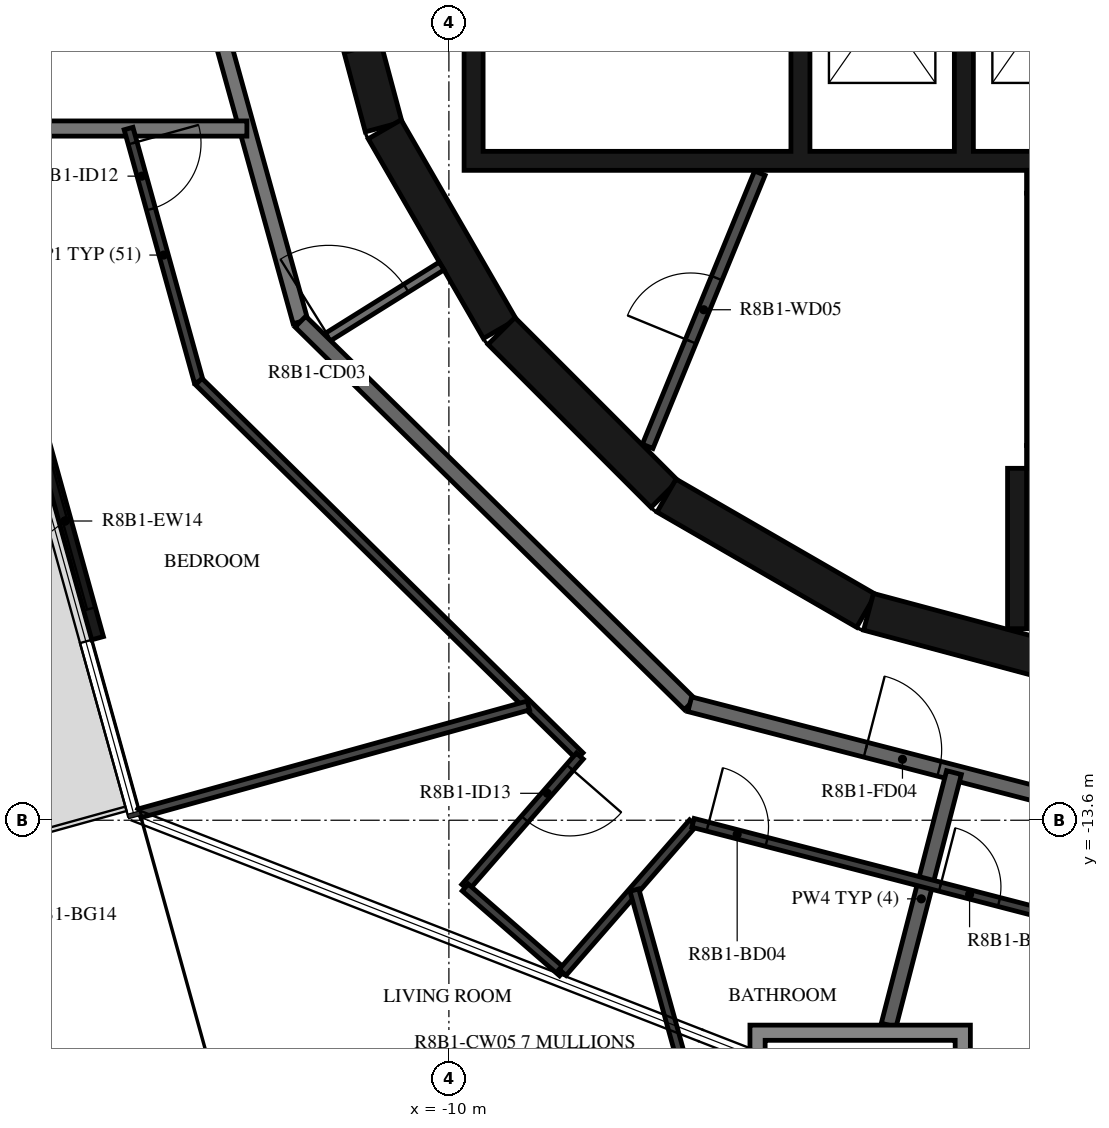
"""IFC4 building model, lengths in metres.
Left out: names, types, materials, properties, quantities, classifications, styles, units other than length and angle.
Written with IfcOpenShell. Run it as: python <this file> out.ifc"""

import sys

from ifc_helpers import new_model, si_unit, direction, frame, frame_2d, origin, place, context, subcontext, project, spatial, polyline, rectangle, outline, extrude, element, fill, save


model = new_model("IFC4")
c1 = context("Model", 3, precision=1e-05, world=origin(), true_north=direction((0.0, 1.0)))
c2 = subcontext(c1, "Body", "Model", "MODEL_VIEW")
j1 = project(units=[si_unit("LENGTHUNIT", "METRE"), si_unit("PLANEANGLEUNIT", "RADIAN")], contexts=[c1])
p1 = place(None, origin())
s1 = spatial("IfcSite", under=j1, at=p1, CompositionType="ELEMENT")
p2 = place(p1, origin())
s2 = spatial("IfcBuilding", under=s1, at=p2, CompositionType="ELEMENT")
p3 = place(p2, frame((0.0, 0.0, 308.7)))
s3 = spatial("IfcBuildingStorey", under=s2, at=p3, CompositionType="ELEMENT", Elevation=308.7)
p4 = place(p3, frame((-15.477, -8.122, 0.0), z_axis=(0.0, 0.0, 1.0), x_axis=(0.267195229387, -0.963642417805, 0.0)))
e1 = element("IfcWall", 1, at=p4, inside=s3, PredefinedType="STANDARD", context=c2, shape_type="SweptSolid", body=[
    extrude(rectangle(XDim=3.2, YDim=0.16, at=frame_2d((1.6, 0.0))), origin(), (0.0, 0.0, 1.0), 3.12),
])
p5 = place(p4, frame((0.4, 0.0, 0.0)))
e2 = element("IfcOpeningElement", 2, at=p5, cuts=e1, PredefinedType="OPENING", context=c2, shape_type="SweptSolid", body=[
    extrude(rectangle(XDim=2.4, YDim=2.4, at=frame_2d((1.2, 1.2))), frame((0.0, 0.09, 0.0), z_axis=(0.0, -1.0, 0.0), x_axis=(1.0, 0.0, 0.0)), (0.0, 0.0, 1.0), 0.18),
])
p6 = place(p3, frame((-11.643, -1.55, 0.0), z_axis=(0.0, 0.0, 1.0), x_axis=(0.258734743916, -0.965948410781, 0.0)))
e3 = element("IfcWall", 3, at=p6, inside=s3, PredefinedType="SHEAR", context=c2, shape_type="SweptSolid", body=[
    extrude(rectangle(XDim=3.033, YDim=0.5, at=frame_2d((1.516, 0.0))), origin(), (0.0, 0.0, 1.0), 3.12),
])
p7 = place(p6, frame((1.066, 0.0, 0.0)))
e4 = element("IfcOpeningElement", 4, at=p7, cuts=e3, PredefinedType="OPENING", context=c2, shape_type="SweptSolid", body=[
    extrude(rectangle(XDim=0.9, YDim=2.1, at=frame_2d((0.45, 1.05))), frame((0.0, 0.26, 0.0), z_axis=(0.0, -1.0, 0.0), x_axis=(1.0, 0.0, 0.0)), (0.0, 0.0, 1.0), 0.52),
])
p8 = place(p3, frame((-10.845, -4.51, 0.0), z_axis=(0.0, 0.0, 1.0), x_axis=(0.500087131594, -0.865975092491, 0.0)))
e5 = element("IfcWall", 5, at=p8, inside=s3, PredefinedType="SHEAR", context=c2, shape_type="SweptSolid", body=[
    extrude(rectangle(XDim=3.033, YDim=0.5, at=frame_2d((1.516, 0.0))), origin(), (0.0, 0.0, 1.0), 3.12),
])
p9 = place(p3, frame((-9.308, -7.164, 0.0), z_axis=(0.0, 0.0, 1.0), x_axis=(0.707106781187, -0.707106781187, 0.0)))
e6 = element("IfcWall", 6, at=p9, inside=s3, PredefinedType="SHEAR", context=c2, shape_type="SweptSolid", body=[
    extrude(rectangle(XDim=3.032, YDim=0.5, at=frame_2d((1.516, 0.0))), origin(), (0.0, 0.0, 1.0), 3.12),
])
for number, where, z_axis, x_axis in (
    (7, (-7.137, -9.329, 0.0), (0.0, 0.0, 1.0), (0.866, -0.5, 0.0)),
    (8, (-4.479, -10.858, 0.0), (0.0, 0.0, 1.0), (0.966, -0.259, 0.0)),
):
    element("IfcWall", number, at=place(p3, frame(where, z_axis=z_axis, x_axis=x_axis)), inside=s3, PredefinedType="SHEAR", context=c2, shape_type="SweptSolid", body=[
        extrude(rectangle(XDim=3.033, YDim=0.5, at=frame_2d((1.516, 0.0))), origin(), (0.0, 0.0, 1.0), 3.12),
    ])
p10 = place(p3, frame((-2.275, -8.67, 0.0), z_axis=(0.0, 0.0, 1.0), x_axis=(0.0, 1.0, 0.0)))
e9 = element("IfcWall", 9, at=p10, inside=s3, PredefinedType="SHEAR", context=c2, shape_type="SweptSolid", body=[
    extrude(rectangle(XDim=3.32, YDim=0.25, at=frame_2d((1.66, 0.0))), origin(), (0.0, 0.0, 1.0), 3.12),
])
p11 = place(p3, frame((-2.4, -5.2, 0.0), z_axis=(0.0, 0.0, 1.0), x_axis=(1.0, 0.0, 0.0)))
e10 = element("IfcWall", 10, at=p11, inside=s3, PredefinedType="SHEAR", context=c2, shape_type="SweptSolid", body=[
    extrude(rectangle(XDim=7.05, YDim=0.3, at=frame_2d((3.525, 0.0))), origin(), (0.0, 0.0, 1.0), 3.12),
])
p12 = place(p3, frame((-2.4, -8.82, 0.0), z_axis=(0.0, 0.0, 1.0), x_axis=(1.0, 0.0, 0.0)))
e11 = element("IfcWall", 11, at=p12, inside=s3, PredefinedType="SHEAR", context=c2, shape_type="SweptSolid", body=[
    extrude(rectangle(XDim=2.5, YDim=0.3, at=frame_2d((1.25, 0.0))), origin(), (0.0, 0.0, 1.0), 3.12),
])
p13 = place(p12, frame((0.65, 0.0, 0.0)))
e12 = element("IfcOpeningElement", 12, at=p13, cuts=e11, PredefinedType="OPENING", context=c2, shape_type="SweptSolid", body=[
    extrude(rectangle(XDim=1.2, YDim=2.1, at=frame_2d((0.6, 1.05))), frame((0.0, 0.16, 0.0), z_axis=(0.0, -1.0, 0.0), x_axis=(1.0, 0.0, 0.0)), (0.0, 0.0, 1.0), 0.32),
])
p14 = place(p3, frame((-2.525, -8.97, 0.0), z_axis=(0.0, 0.0, 1.0), x_axis=(0.0, -1.0, 0.0)))
e13 = element("IfcWall", 13, at=p14, inside=s3, PredefinedType="SHEAR", context=c2, shape_type="SweptSolid", body=[
    extrude(rectangle(XDim=2.11, YDim=0.25, at=frame_2d((1.055, 0.0))), origin(), (0.0, 0.0, 1.0), 3.12),
])
p15 = place(p3, origin())
e14 = element("IfcWall", 14, at=p15, inside=s3, PredefinedType="SHEAR", context=c2, shape_type="SweptSolid", body=[
    extrude(outline(polyline([(9.8, -5.05), (9.8, -4.8), (9.8, -1.9), (9.55, -1.9), (9.55, -4.8), (7.65, -4.8), (7.65, -1.9), (7.4, -1.9), (7.4, -4.8), (5.5, -4.8), (5.5, -1.9), (5.25, -1.9), (5.25, -4.8), (3.35, -4.8), (3.35, -1.9), (3.1, -1.9), (3.1, -4.8), (1.2, -4.8), (1.2, -1.9), (0.95, -1.9), (0.95, -4.8), (-0.95, -4.8), (-0.95, -1.9), (-1.2, -1.9), (-1.2, -4.8), (-3.1, -4.8), (-3.1, -1.9), (-3.35, -1.9), (-3.35, -4.8), (-5.25, -4.8), (-5.25, -1.9), (-5.5, -1.9), (-5.5, -4.8), (-9.55, -4.8), (-9.55, -1.9), (-9.8, -1.9), (-9.8, -4.8), (-9.8, -5.05), (9.8, -5.05)])), origin(), (0.0, 0.0, 1.0), 3.12),
])
p16 = place(p3, frame((-7.385, -8.681, 0.0), z_axis=(0.0, 0.0, 1.0), x_axis=(0.379804590409, 0.925066739811, 0.0)))
e15 = element("IfcWall", 15, at=p16, inside=s3, PredefinedType="PARTITIONING", context=c2, shape_type="SweptSolid", body=[
    extrude(rectangle(XDim=3.885, YDim=0.15, at=frame_2d((1.942, 0.0))), origin(), (0.0, 0.0, 1.0), 3.12),
])
p17 = place(p16, frame((1.493, 0.0, 0.0)))
e16 = element("IfcOpeningElement", 16, at=p17, cuts=e15, PredefinedType="OPENING", context=c2, shape_type="SweptSolid", body=[
    extrude(rectangle(XDim=0.9, YDim=2.1, at=frame_2d((0.45, 1.05))), frame((0.0, 0.085, 0.0), z_axis=(0.0, -1.0, 0.0), x_axis=(1.0, 0.0, 0.0)), (0.0, 0.0, 1.0), 0.17),
])
p18 = place(p3, frame((-11.687, -7.303, 0.0), z_axis=(0.0, 0.0, 1.0), x_axis=(0.848064094072, 0.529893661357, 0.0)))
e17 = element("IfcWall", 17, at=p18, inside=s3, PredefinedType="PARTITIONING", context=c2, shape_type="SweptSolid", body=[
    extrude(rectangle(XDim=1.876, YDim=0.12, at=frame_2d((0.938, 0.0))), origin(), (0.0, 0.0, 1.0), 3.12),
])
p19 = place(p18, frame((0.125, 0.0, 0.0)))
e18 = element("IfcOpeningElement", 18, at=p19, cuts=e17, PredefinedType="OPENING", context=c2, shape_type="SweptSolid", body=[
    extrude(rectangle(XDim=1.2, YDim=2.1, at=frame_2d((0.6, 1.05))), frame((0.0, 0.07, 0.0), z_axis=(0.0, -1.0, 0.0), x_axis=(1.0, 0.0, 0.0)), (0.0, 0.0, 1.0), 0.14),
])
p20 = place(p3, frame((-13.872, -0.121, 0.0), z_axis=(0.0, 0.0, 1.0), x_axis=(0.267254575108, -0.963625960674, 0.0)))
e19 = element("IfcWall", 19, at=p20, inside=s3, PredefinedType="STANDARD", context=c2, shape_type="SweptSolid", body=[
    extrude(rectangle(XDim=7.181, YDim=0.2, at=frame_2d((3.591, 0.0))), origin(), (0.0, 0.0, 1.0), 3.12),
])
p21 = place(p3, frame((-11.953, -7.041, 0.0), z_axis=(0.0, 0.0, 1.0), x_axis=(0.713250549143, -0.70090916255, 0.0)))
e20 = element("IfcWall", 20, at=p21, inside=s3, PredefinedType="STANDARD", context=c2, shape_type="SweptSolid", body=[
    extrude(rectangle(XDim=7.181, YDim=0.2, at=frame_2d((3.59, 0.0))), origin(), (0.0, 0.0, 1.0), 3.12),
])
p22 = place(p3, frame((-6.831, -12.074, 0.0), z_axis=(0.0, 0.0, 1.0), x_axis=(0.968144780225, -0.250391063186, 0.0)))
e21 = element("IfcWall", 21, at=p22, inside=s3, PredefinedType="STANDARD", context=c2, shape_type="SweptSolid", body=[
    extrude(rectangle(XDim=7.181, YDim=0.2, at=frame_2d((3.591, 0.0))), origin(), (0.0, 0.0, 1.0), 3.12),
])
p23 = place(p22, frame((2.39, 0.0, 0.0)))
e22 = element("IfcOpeningElement", 22, at=p23, cuts=e21, PredefinedType="OPENING", context=c2, shape_type="SweptSolid", body=[
    extrude(rectangle(XDim=1.0, YDim=2.1, at=frame_2d((0.5, 1.05))), frame((0.0, 0.11, 0.0), z_axis=(0.0, -1.0, 0.0), x_axis=(1.0, 0.0, 0.0)), (0.0, 0.0, 1.0), 0.22),
])
p24 = place(p22, frame((5.69, 0.0, 0.0)))
e23 = element("IfcOpeningElement", 23, at=p24, cuts=e21, PredefinedType="OPENING", context=c2, shape_type="SweptSolid", body=[
    extrude(rectangle(XDim=1.0, YDim=2.1, at=frame_2d((0.5, 1.05))), frame((0.0, 0.11, 0.0), z_axis=(0.0, -1.0, 0.0), x_axis=(1.0, 0.0, 0.0)), (0.0, 0.0, 1.0), 0.22),
])
p25 = place(p3, frame((-16.564, -4.5, 0.0), z_axis=(0.0, 0.0, 1.0), x_axis=(1.0, 0.0, 0.0)))
e24 = element("IfcWall", 24, at=p25, inside=s3, PredefinedType="STANDARD", context=c2, shape_type="SweptSolid", body=[
    extrude(rectangle(XDim=3.907, YDim=0.2, at=frame_2d((1.953, 0.0))), origin(), (0.0, 0.0, 1.0), 3.12),
])
p26 = place(p3, frame((-4.214, -16.295, 0.0), z_axis=(0.0, 0.0, 1.0), x_axis=(0.250428810918, 0.968135016752, 0.0)))
e25 = element("IfcWall", 25, at=p26, inside=s3, PredefinedType="STANDARD", context=c2, shape_type="SweptSolid", body=[
    extrude(rectangle(XDim=3.432, YDim=0.2, at=frame_2d((1.716, 0.0))), origin(), (0.0, 0.0, 1.0), 3.12),
])
p27 = place(p3, frame((-14.214, -4.5, 0.0), z_axis=(0.0, 0.0, 1.0), x_axis=(0.267199167841, -0.963641325756, 0.0)))
e26 = element("IfcWall", 26, at=p27, inside=s3, PredefinedType="PARTITIONING", context=c2, shape_type="SweptSolid", body=[
    extrude(rectangle(XDim=3.455, YDim=0.12, at=frame_2d((1.727, 0.0))), origin(), (0.0, 0.0, 1.0), 3.12),
])
p28 = place(p27, frame((0.2, 0.0, 0.0)))
e27 = element("IfcOpeningElement", 27, at=p28, cuts=e26, PredefinedType="OPENING", context=c2, shape_type="SweptSolid", body=[
    extrude(rectangle(XDim=0.9, YDim=2.1, at=frame_2d((0.45, 1.05))), frame((0.0, 0.07, 0.0), z_axis=(0.0, -1.0, 0.0), x_axis=(1.0, 0.0, 0.0)), (0.0, 0.0, 1.0), 0.14),
])
p29 = place(p3, frame((-13.291, -7.829, 0.0), z_axis=(0.0, 0.0, 1.0), x_axis=(0.71326209988, -0.700897408238, 0.0)))
e28 = element("IfcWall", 28, at=p29, inside=s3, PredefinedType="PARTITIONING", context=c2, shape_type="SweptSolid", body=[
    extrude(rectangle(XDim=7.029, YDim=0.12, at=frame_2d((3.515, 0.0))), origin(), (0.0, 0.0, 1.0), 3.12),
])
p30 = place(p3, frame((-8.278, -12.756, 0.0), z_axis=(0.0, 0.0, 1.0), x_axis=(-0.657358463875, -0.753578031774, 0.0)))
e29 = element("IfcWall", 29, at=p30, inside=s3, PredefinedType="PARTITIONING", context=c2, shape_type="SweptSolid", body=[
    extrude(rectangle(XDim=2.294, YDim=0.12, at=frame_2d((1.147, 0.0))), origin(), (0.0, 0.0, 1.0), 3.12),
])
p31 = place(p30, frame((0.2, 0.0, 0.0)))
e30 = element("IfcOpeningElement", 30, at=p31, cuts=e29, PredefinedType="OPENING", context=c2, shape_type="SweptSolid", body=[
    extrude(rectangle(XDim=0.9, YDim=2.1, at=frame_2d((0.45, 1.05))), frame((0.0, 0.07, 0.0), z_axis=(0.0, -1.0, 0.0), x_axis=(1.0, 0.0, 0.0)), (0.0, 0.0, 1.0), 0.14),
])
p32 = place(p3, frame((-9.785, -14.484, 0.0), z_axis=(0.0, 0.0, 1.0), x_axis=(0.753643217927, -0.657283728745, 0.0)))
e31 = element("IfcWall", 31, at=p32, inside=s3, PredefinedType="PARTITIONING", context=c2, shape_type="SweptSolid", body=[
    extrude(rectangle(XDim=1.7, YDim=0.12, at=frame_2d((0.85, 0.0))), origin(), (0.0, 0.0, 1.0), 3.12),
])
p33 = place(p3, frame((-8.504, -15.602, 0.0), z_axis=(0.0, 0.0, 1.0), x_axis=(0.657298689015, 0.753630170189, 0.0)))
e32 = element("IfcWall", 32, at=p33, inside=s3, PredefinedType="PARTITIONING", context=c2, shape_type="SweptSolid", body=[
    extrude(rectangle(XDim=2.61, YDim=0.12, at=frame_2d((1.305, 0.0))), origin(), (0.0, 0.0, 1.0), 3.12),
])
p34 = place(p3, frame((-6.788, -13.635, 0.0), z_axis=(0.0, 0.0, 1.0), x_axis=(0.968142345176, -0.250400478189, 0.0)))
e33 = element("IfcWall", 33, at=p34, inside=s3, PredefinedType="PARTITIONING", context=c2, shape_type="SweptSolid", body=[
    extrude(rectangle(XDim=7.151, YDim=0.12, at=frame_2d((3.575, 0.0))), origin(), (0.0, 0.0, 1.0), 3.12),
])
p35 = place(p34, frame((0.2, 0.0, 0.0)))
e34 = element("IfcOpeningElement", 34, at=p35, cuts=e33, PredefinedType="OPENING", context=c2, shape_type="SweptSolid", body=[
    extrude(rectangle(XDim=0.8, YDim=2.1, at=frame_2d((0.4, 1.05))), frame((0.0, 0.07, 0.0), z_axis=(0.0, -1.0, 0.0), x_axis=(1.0, 0.0, 0.0)), (0.0, 0.0, 1.0), 0.14),
])
p36 = place(p34, frame((3.358, 0.0, 0.0)))
e35 = element("IfcOpeningElement", 35, at=p36, cuts=e33, PredefinedType="OPENING", context=c2, shape_type="SweptSolid", body=[
    extrude(rectangle(XDim=0.8, YDim=2.1, at=frame_2d((0.4, 1.05))), frame((0.0, 0.07, 0.0), z_axis=(0.0, -1.0, 0.0), x_axis=(1.0, 0.0, 0.0)), (0.0, 0.0, 1.0), 0.14),
])
p37 = place(p3, frame((-14.066, -13.508, 0.0), z_axis=(0.0, 0.0, 1.0), x_axis=(0.963634530082, 0.267223674913, 0.0)))
e36 = element("IfcWall", 36, at=p37, inside=s3, PredefinedType="PARTITIONING", context=c2, shape_type="SweptSolid", body=[
    extrude(rectangle(XDim=5.304, YDim=0.12, at=frame_2d((2.652, 0.0))), origin(), (0.0, 0.0, 1.0), 2.73),
])
p38 = place(p3, frame((-6.61, -17.943, 0.0), z_axis=(0.0, 0.0, 1.0), x_axis=(-0.267254066434, 0.96362610175, 0.0)))
e37 = element("IfcWall", 37, at=p38, inside=s3, PredefinedType="PARTITIONING", context=c2, shape_type="SweptSolid", body=[
    extrude(rectangle(XDim=3.553, YDim=0.12, at=frame_2d((1.777, 0.0))), origin(), (0.0, 0.0, 1.0), 3.12),
])
p39 = place(p3, frame((-2.918, -18.898, 0.0), z_axis=(0.0, 0.0, 1.0), x_axis=(0.700881606707, 0.713277627141, 0.0)))
e38 = element("IfcWall", 38, at=p39, inside=s3, PredefinedType="PARTITIONING", context=c2, shape_type="SweptSolid", body=[
    extrude(rectangle(XDim=5.062, YDim=0.12, at=frame_2d((2.531, 0.0))), origin(), (0.0, 0.0, 1.0), 3.12),
])
p40 = place(p3, origin())
e39 = element("IfcWall", 39, at=p40, inside=s3, PredefinedType="STANDARD", context=c2, shape_type="SweptSolid", body=[
    extrude(outline(polyline([(-3.139, -16.295), (-3.139, -19.195), (-6.039, -19.195), (-6.039, -16.295), (-3.139, -16.295)]), holes=[polyline([(-5.839, -18.995), (-3.339, -18.995), (-3.339, -16.495), (-5.839, -16.495), (-5.839, -18.995)])]), origin(), (0.0, 0.0, 1.0), 3.12),
])
p41 = place(p5, origin())
e40 = element("IfcDoor", 40, at=p41, inside=s3, OperationType="DOUBLE_DOOR_SLIDING", PredefinedType="DOOR", context=c2, shape_type="SweptSolid", body=[
    extrude(rectangle(XDim=2.4, YDim=2.4, at=frame_2d((1.2, 1.2))), frame((0.0, 0.025, 0.0), z_axis=(0.0, -1.0, 0.0), x_axis=(1.0, 0.0, 0.0)), (0.0, 0.0, 1.0), 0.05),
])
fill(e2, e40)
p42 = place(p17, origin())
e41 = element("IfcDoor", 41, at=p42, inside=s3, OperationType="SINGLE_SWING_LEFT", PredefinedType="DOOR", context=c2, shape_type="SweptSolid", body=[
    extrude(rectangle(XDim=0.9, YDim=2.1, at=frame_2d((0.45, 1.05))), frame((0.0, 0.025, 0.0), z_axis=(0.0, -1.0, 0.0), x_axis=(1.0, 0.0, 0.0)), (0.0, 0.0, 1.0), 0.05),
])
fill(e16, e41)
p43 = place(p23, origin())
e42 = element("IfcDoor", 42, at=p43, inside=s3, OperationType="SINGLE_SWING_RIGHT", PredefinedType="DOOR", context=c2, shape_type="SweptSolid", body=[
    extrude(rectangle(XDim=1.0, YDim=2.1, at=frame_2d((0.5, 1.05))), frame((0.0, 0.025, 0.0), z_axis=(0.0, -1.0, 0.0), x_axis=(1.0, 0.0, 0.0)), (0.0, 0.0, 1.0), 0.05),
])
fill(e22, e42)
p44 = place(p28, origin())
e43 = element("IfcDoor", 43, at=p44, inside=s3, OperationType="SINGLE_SWING_RIGHT", PredefinedType="DOOR", context=c2, shape_type="SweptSolid", body=[
    extrude(rectangle(XDim=0.9, YDim=2.1, at=frame_2d((0.45, 1.05))), frame((0.0, 0.025, 0.0), z_axis=(0.0, -1.0, 0.0), x_axis=(1.0, 0.0, 0.0)), (0.0, 0.0, 1.0), 0.05),
])
fill(e27, e43)
p45 = place(p31, origin())
e44 = element("IfcDoor", 44, at=p45, inside=s3, OperationType="SINGLE_SWING_RIGHT", PredefinedType="DOOR", context=c2, shape_type="SweptSolid", body=[
    extrude(rectangle(XDim=0.9, YDim=2.1, at=frame_2d((0.45, 1.05))), frame((0.0, 0.025, 0.0), z_axis=(0.0, -1.0, 0.0), x_axis=(1.0, 0.0, 0.0)), (0.0, 0.0, 1.0), 0.05),
])
fill(e30, e44)
p46 = place(p35, origin())
e45 = element("IfcDoor", 45, at=p46, inside=s3, OperationType="SINGLE_SWING_RIGHT", PredefinedType="DOOR", context=c2, shape_type="SweptSolid", body=[
    extrude(rectangle(XDim=0.8, YDim=2.1, at=frame_2d((0.4, 1.05))), frame((0.0, 0.025, 0.0), z_axis=(0.0, -1.0, 0.0), x_axis=(1.0, 0.0, 0.0)), (0.0, 0.0, 1.0), 0.05),
])
fill(e34, e45)
p47 = place(p36, origin())
e46 = element("IfcDoor", 46, at=p47, inside=s3, OperationType="SINGLE_SWING_RIGHT", PredefinedType="DOOR", context=c2, shape_type="SweptSolid", body=[
    extrude(rectangle(XDim=0.8, YDim=2.1, at=frame_2d((0.4, 1.05))), frame((0.0, 0.025, 0.0), z_axis=(0.0, -1.0, 0.0), x_axis=(1.0, 0.0, 0.0)), (0.0, 0.0, 1.0), 0.05),
])
fill(e35, e46)
p48 = place(p19, origin())
e47 = element("IfcDoor", 47, at=p48, inside=s3, OperationType="DOUBLE_DOOR_SINGLE_SWING", PredefinedType="DOOR", context=c2, shape_type="SweptSolid", body=[
    extrude(rectangle(XDim=1.2, YDim=2.1, at=frame_2d((0.6, 1.05))), frame((0.0, 0.025, 0.0), z_axis=(0.0, -1.0, 0.0), x_axis=(1.0, 0.0, 0.0)), (0.0, 0.0, 1.0), 0.05),
])
fill(e18, e47)
save(model, sys.argv[1])
